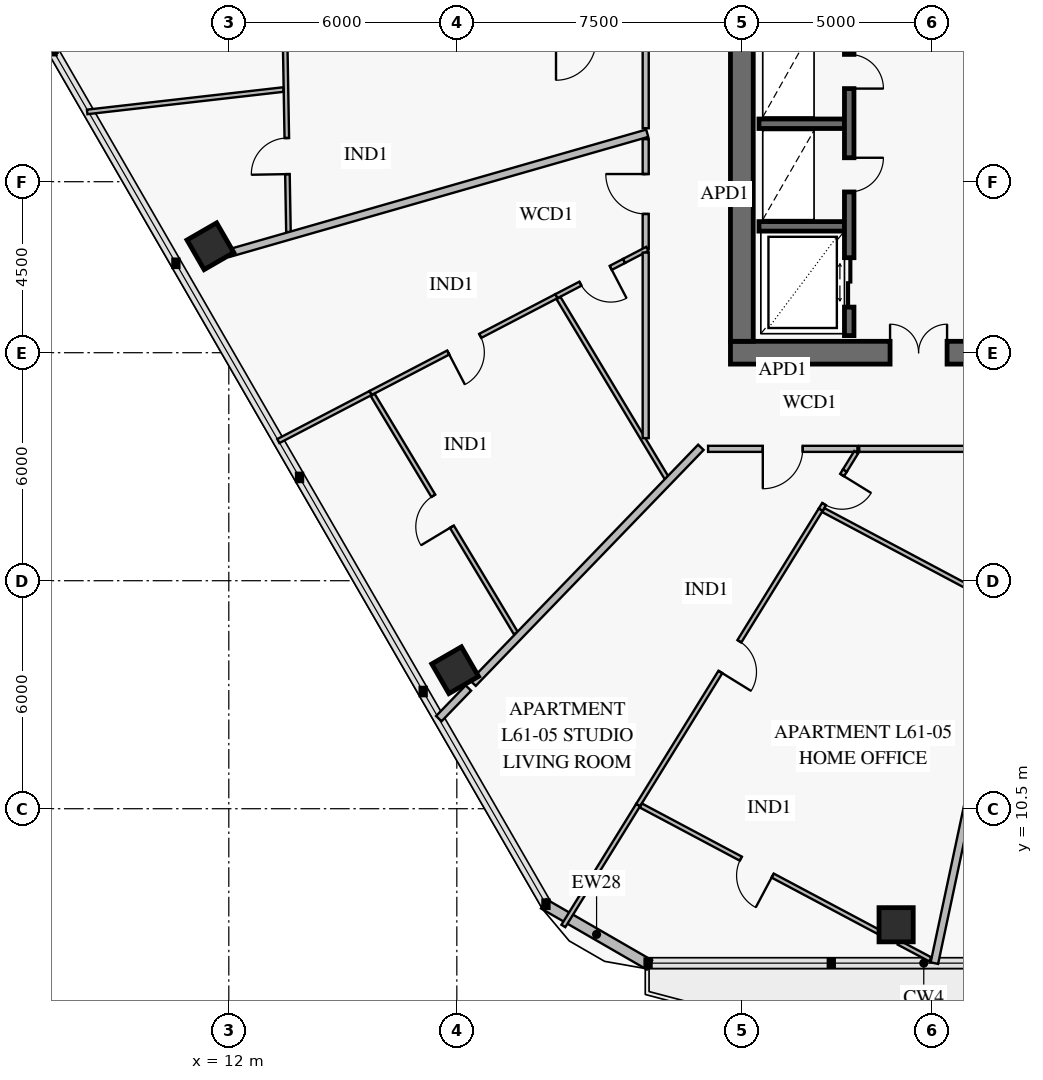
"""IFC4 building model, lengths in metres.
Left out: names, types, materials, properties, quantities, classifications, styles, units other than length and angle.
Written with IfcOpenShell. Run it as: python <this file> out.ifc"""

import sys

from ifc_helpers import new_model, si_unit, direction, frame, frame_2d, origin, origin_2d, place, context, subcontext, project, spatial, rectangle, extrude, element, fill, save


model = new_model("IFC4")
c1 = context("Model", 3, precision=1e-05, world=origin(), true_north=direction((0.0, 1.0)))
c2 = subcontext(c1, "Body", "Model", "MODEL_VIEW")
j1 = project(units=[si_unit("LENGTHUNIT", "METRE"), si_unit("PLANEANGLEUNIT", "RADIAN")], contexts=[c1])
p1 = place(None, origin())
s1 = spatial("IfcSite", under=j1, at=p1, CompositionType="ELEMENT")
p2 = place(p1, origin())
s2 = spatial("IfcBuilding", under=s1, at=p2, CompositionType="ELEMENT")
p3 = place(p2, frame((0.0, 0.0, 242.6)))
s3 = spatial("IfcBuildingStorey", under=s2, at=p3, CompositionType="ELEMENT", Elevation=242.6)
p4 = place(p3, frame((25.2, 22.5, 0.0), z_axis=(0.0, 0.0, 1.0), x_axis=(1.0, 0.0, 0.0)))
e1 = element("IfcWall", 1, at=p4, inside=s3, PredefinedType="SHEAR", context=c2, shape_type="SweptSolid", body=[
    extrude(rectangle(XDim=9.85, YDim=0.6, at=frame_2d((4.925, 0.0))), origin(), (0.0, 0.0, 1.0), 3.8),
])
p5 = place(p4, frame((4.2, 0.0, 0.0)))
e2 = element("IfcOpeningElement", 2, at=p5, cuts=e1, PredefinedType="OPENING", context=c2, shape_type="SweptSolid", body=[
    extrude(rectangle(XDim=1.5, YDim=2.15, at=frame_2d((0.75, 1.075))), frame((0.0, 0.312, 0.0), z_axis=(0.0, -1.0, 0.0), x_axis=(1.0, 0.0, 0.0)), (0.0, 0.0, 1.0), 0.624),
])
p6 = place(p3, frame((25.5, 22.8, 0.0), z_axis=(0.0, 0.0, 1.0), x_axis=(0.0, 1.0, 0.0)))
e3 = element("IfcWall", 3, at=p6, inside=s3, PredefinedType="SHEAR", context=c2, shape_type="SweptSolid", body=[
    extrude(rectangle(XDim=18.4, YDim=0.6, at=frame_2d((9.2, 0.0))), origin(), (0.0, 0.0, 1.0), 3.8),
])
p7 = place(p6, frame((8.95, 0.0, 0.0)))
e4 = element("IfcOpeningElement", 4, at=p7, cuts=e3, PredefinedType="OPENING", context=c2, shape_type="SweptSolid", body=[
    extrude(rectangle(XDim=1.1, YDim=2.15, at=frame_2d((0.55, 1.075))), frame((0.0, 0.312, 0.0), z_axis=(0.0, -1.0, 0.0), x_axis=(1.0, 0.0, 0.0)), (0.0, 0.0, 1.0), 0.624),
])
for number, where, z_axis, x_axis in (
    (5, (11.515, 25.301, 0.0), (0.0, 0.0, 1.0), (0.5, -0.866, 0.0)),
    (6, (17.956, 14.145, 0.0), (0.0, 0.0, 1.0), (0.5, -0.866, 0.0)),
    (7, (29.559, 7.446, 0.0), (0.0, 0.0, 1.0), (1.0, 0.0, 0.0)),
):
    element("IfcColumn", number, at=place(p3, frame(where, z_axis=z_axis, x_axis=x_axis)), inside=s3, PredefinedType="COLUMN", context=c2, shape_type="SweptSolid", body=[
        extrude(rectangle(XDim=0.9, YDim=0.9, at=origin_2d()), origin(), (0.0, 0.0, 1.0), 3.55),
    ])
for number, where, z_axis, x_axis in (
    (8, (23.07, 6.389, 0.0), (0.0, 0.0, 1.0), (-0.866, 0.5, 0.0)),
    (9, (7.355, 30.393, 0.0), (0.0, 0.0, 1.0), (0.0, 1.0, 0.0)),
):
    element("IfcWall", number, at=place(p3, frame(where, z_axis=z_axis, x_axis=x_axis)), inside=s3, PredefinedType="SOLIDWALL", context=c2, shape_type="SweptSolid", body=[
        extrude(rectangle(XDim=3.215, YDim=0.28, at=frame_2d((1.607, 0.0))), origin(), (0.0, 0.0, 1.0), 3.55),
    ])
for number, where, z_axis, x_axis in (
    (10, (25.95, 25.825, 0.0), (0.0, 0.0, 1.0), (1.0, 0.0, 0.0)),
    (11, (25.95, 28.525, 0.0), (0.0, 0.0, 1.0), (1.0, 0.0, 0.0)),
):
    element("IfcWall", number, at=place(p3, frame(where, z_axis=z_axis, x_axis=x_axis)), inside=s3, PredefinedType="SOLIDWALL", context=c2, shape_type="SweptSolid", body=[
        extrude(rectangle(XDim=2.25, YDim=0.25, at=frame_2d((1.125, 0.0))), origin(), (0.0, 0.0, 1.0), 3.8),
    ])
p8 = place(p3, frame((28.325, 22.95, 0.0), z_axis=(0.0, 0.0, 1.0), x_axis=(0.0, 1.0, 0.0)))
e12 = element("IfcWall", 12, at=p8, inside=s3, PredefinedType="SOLIDWALL", context=c2, shape_type="SweptSolid", body=[
    extrude(rectangle(XDim=8.2, YDim=0.25, at=frame_2d((4.1, 0.0))), origin(), (0.0, 0.0, 1.0), 3.8),
])
p9 = place(p8, frame((0.75, 0.0, 0.0)))
e13 = element("IfcOpeningElement", 13, at=p9, cuts=e12, PredefinedType="OPENING", context=c2, shape_type="SweptSolid", body=[
    extrude(rectangle(XDim=1.3, YDim=2.3, at=frame_2d((0.65, 1.15))), frame((0.0, 0.137, 0.0), z_axis=(0.0, -1.0, 0.0), x_axis=(1.0, 0.0, 0.0)), (0.0, 0.0, 1.0), 0.274),
])
p10 = place(p8, frame((3.78, 0.0, 0.0)))
e14 = element("IfcOpeningElement", 14, at=p10, cuts=e12, PredefinedType="OPENING", context=c2, shape_type="SweptSolid", body=[
    extrude(rectangle(XDim=0.9, YDim=2.1, at=frame_2d((0.45, 1.05))), frame((0.0, 0.137, 0.0), z_axis=(0.0, -1.0, 0.0), x_axis=(1.0, 0.0, 0.0)), (0.0, 0.0, 1.0), 0.274),
])
p11 = place(p8, frame((6.5, 0.0, 0.0)))
e15 = element("IfcOpeningElement", 15, at=p11, cuts=e12, PredefinedType="OPENING", context=c2, shape_type="SweptSolid", body=[
    extrude(rectangle(XDim=0.9, YDim=2.1, at=frame_2d((0.45, 1.05))), frame((0.0, 0.137, 0.0), z_axis=(0.0, -1.0, 0.0), x_axis=(1.0, 0.0, 0.0)), (0.0, 0.0, 1.0), 0.274),
])
p12 = place(p3, frame((13.44, 33.077, 0.0), z_axis=(0.0, 0.0, 1.0), x_axis=(0.01747984643, -0.999847215813, 0.0)))
e16 = element("IfcWall", 16, at=p12, inside=s3, PredefinedType="PARTITIONING", context=c2, shape_type="SweptSolid", body=[
    extrude(rectangle(XDim=7.403, YDim=0.12, at=frame_2d((3.701, 0.0))), origin(), (0.0, 0.0, 1.0), 2.95),
])
p13 = place(p12, frame((1.468, 0.0, 0.0)))
e17 = element("IfcOpeningElement", 17, at=p13, cuts=e16, PredefinedType="OPENING", context=c2, shape_type="SweptSolid", body=[
    extrude(rectangle(XDim=0.95, YDim=2.1, at=frame_2d((0.475, 1.05))), frame((0.0, 0.072, 0.0), z_axis=(0.0, -1.0, 0.0), x_axis=(1.0, 0.0, 0.0)), (0.0, 0.0, 1.0), 0.144),
])
p14 = place(p12, frame((4.929, 0.0, 0.0)))
e18 = element("IfcOpeningElement", 18, at=p14, cuts=e16, PredefinedType="OPENING", context=c2, shape_type="SweptSolid", body=[
    extrude(rectangle(XDim=0.95, YDim=2.1, at=frame_2d((0.475, 1.05))), frame((0.0, 0.072, 0.0), z_axis=(0.0, -1.0, 0.0), x_axis=(1.0, 0.0, 0.0)), (0.0, 0.0, 1.0), 0.144),
])
p15 = place(p3, frame((22.4, 24.914, 0.0), z_axis=(0.0, 0.0, 1.0), x_axis=(-0.886792724396, -0.462167354926, 0.0)))
e19 = element("IfcWall", 19, at=p15, inside=s3, PredefinedType="PARTITIONING", context=c2, shape_type="SweptSolid", body=[
    extrude(rectangle(XDim=2.01, YDim=0.12, at=frame_2d((1.005, 0.0))), origin(), (0.0, 0.0, 1.0), 3.55),
])
p16 = place(p15, frame((0.394, 0.0, 0.0)))
e20 = element("IfcOpeningElement", 20, at=p16, cuts=e19, PredefinedType="OPENING", context=c2, shape_type="SweptSolid", body=[
    extrude(rectangle(XDim=0.9, YDim=2.1, at=frame_2d((0.45, 1.05))), frame((0.0, 0.072, 0.0), z_axis=(0.0, -1.0, 0.0), x_axis=(1.0, 0.0, 0.0)), (0.0, 0.0, 1.0), 0.144),
])
p17 = place(p3, frame((20.618, 23.986, 0.0), z_axis=(0.0, 0.0, 1.0), x_axis=(-0.886846806797, -0.462063568434, 0.0)))
e21 = element("IfcWall", 21, at=p17, inside=s3, PredefinedType="PARTITIONING", context=c2, shape_type="SweptSolid", body=[
    extrude(rectangle(XDim=5.514, YDim=0.12, at=frame_2d((2.757, 0.0))), origin(), (0.0, 0.0, 1.0), 3.15),
])
p18 = place(p17, frame((2.257, 0.0, 0.0)))
e22 = element("IfcOpeningElement", 22, at=p18, cuts=e21, PredefinedType="OPENING", context=c2, shape_type="SweptSolid", body=[
    extrude(rectangle(XDim=0.95, YDim=2.1, at=frame_2d((0.475, 1.05))), frame((0.0, 0.072, 0.0), z_axis=(0.0, -1.0, 0.0), x_axis=(1.0, 0.0, 0.0)), (0.0, 0.0, 1.0), 0.144),
])
p19 = place(p3, frame((15.785, 21.391, 0.0), z_axis=(0.0, 0.0, 1.0), x_axis=(0.515050233646, -0.857159994879, 0.0)))
e23 = element("IfcWall", 23, at=p19, inside=s3, PredefinedType="PARTITIONING", context=c2, shape_type="SweptSolid", body=[
    extrude(rectangle(XDim=7.315, YDim=0.12, at=frame_2d((3.658, 0.0))), origin(), (0.0, 0.0, 1.0), 2.95),
])
p20 = place(p19, frame((3.099, 0.0, 0.0)))
e24 = element("IfcOpeningElement", 24, at=p20, cuts=e23, PredefinedType="OPENING", context=c2, shape_type="SweptSolid", body=[
    extrude(rectangle(XDim=0.95, YDim=2.1, at=frame_2d((0.475, 1.05))), frame((0.0, 0.072, 0.0), z_axis=(0.0, -1.0, 0.0), x_axis=(1.0, 0.0, 0.0)), (0.0, 0.0, 1.0), 0.144),
])
p21 = place(p3, frame((22.97, 28.119, 0.0), z_axis=(0.0, 0.0, 1.0), x_axis=(0.0, -1.0, 0.0)))
e25 = element("IfcWall", 25, at=p21, inside=s3, PredefinedType="PARTITIONING", context=c2, shape_type="SweptSolid", body=[
    extrude(rectangle(XDim=2.885, YDim=0.16, at=frame_2d((1.443, 0.0))), origin(), (0.0, 0.0, 1.0), 3.55),
])
p22 = place(p21, frame((0.918, 0.0, 0.0)))
e26 = element("IfcOpeningElement", 26, at=p22, cuts=e25, PredefinedType="OPENING", context=c2, shape_type="SweptSolid", body=[
    extrude(rectangle(XDim=1.05, YDim=2.15, at=frame_2d((0.525, 1.075))), frame((0.0, 0.092, 0.0), z_axis=(0.0, -1.0, 0.0), x_axis=(1.0, 0.0, 0.0)), (0.0, 0.0, 1.0), 0.184),
])
p23 = place(p3, frame((28.212, 19.4, 0.0), z_axis=(0.0, 0.0, 1.0), x_axis=(-0.525724166979, -0.850655100646, 0.0)))
e27 = element("IfcWall", 27, at=p23, inside=s3, PredefinedType="PARTITIONING", context=c2, shape_type="SweptSolid", body=[
    extrude(rectangle(XDim=1.213, YDim=0.12, at=frame_2d((0.607, 0.0))), origin(), (0.0, 0.0, 1.0), 3.55),
])
p24 = place(p23, frame((0.14, 0.0, 0.0)))
e28 = element("IfcOpeningElement", 28, at=p24, cuts=e27, PredefinedType="OPENING", context=c2, shape_type="SweptSolid", body=[
    extrude(rectangle(XDim=0.9, YDim=2.1, at=frame_2d((0.45, 1.05))), frame((0.0, 0.072, 0.0), z_axis=(0.0, -1.0, 0.0), x_axis=(1.0, 0.0, 0.0)), (0.0, 0.0, 1.0), 0.144),
])
p25 = place(p3, frame((27.574, 18.368, 0.0), z_axis=(0.0, 0.0, 1.0), x_axis=(-0.525774998316, -0.850623683626, 0.0)))
e29 = element("IfcWall", 29, at=p25, inside=s3, PredefinedType="PARTITIONING", context=c2, shape_type="SweptSolid", body=[
    extrude(rectangle(XDim=9.137, YDim=0.12, at=frame_2d((4.569, 0.0))), origin(), (0.0, 0.0, 1.0), 2.93),
])
p26 = place(p25, frame((4.069, 0.0, 0.0)))
e30 = element("IfcOpeningElement", 30, at=p26, cuts=e29, PredefinedType="OPENING", context=c2, shape_type="SweptSolid", body=[
    extrude(rectangle(XDim=0.95, YDim=2.1, at=frame_2d((0.475, 1.05))), frame((0.0, 0.072, 0.0), z_axis=(0.0, -1.0, 0.0), x_axis=(1.0, 0.0, 0.0)), (0.0, 0.0, 1.0), 0.144),
])
p27 = place(p3, frame((22.843, 10.584, 0.0), z_axis=(0.0, 0.0, 1.0), x_axis=(0.882936922094, -0.469491631026, 0.0)))
e31 = element("IfcWall", 31, at=p27, inside=s3, PredefinedType="PARTITIONING", context=c2, shape_type="SweptSolid", body=[
    extrude(rectangle(XDim=7.074, YDim=0.12, at=frame_2d((3.537, 0.0))), origin(), (0.0, 0.0, 1.0), 3.55),
])
p28 = place(p27, frame((2.978, 0.0, 0.0)))
e32 = element("IfcOpeningElement", 32, at=p28, cuts=e31, PredefinedType="OPENING", context=c2, shape_type="SweptSolid", body=[
    extrude(rectangle(XDim=0.95, YDim=2.1, at=frame_2d((0.475, 1.05))), frame((0.0, 0.072, 0.0), z_axis=(0.0, -1.0, 0.0), x_axis=(1.0, 0.0, 0.0)), (0.0, 0.0, 1.0), 0.144),
])
p29 = place(p3, frame((24.612, 19.97, 0.0), z_axis=(0.0, 0.0, 1.0), x_axis=(1.0, 0.0, 0.0)))
e33 = element("IfcWall", 33, at=p29, inside=s3, PredefinedType="PARTITIONING", context=c2, shape_type="SweptSolid", body=[
    extrude(rectangle(XDim=3.929, YDim=0.16, at=frame_2d((1.965, 0.0))), origin(), (0.0, 0.0, 1.0), 3.55),
])
p30 = place(p29, frame((1.44, 0.0, 0.0)))
e34 = element("IfcOpeningElement", 34, at=p30, cuts=e33, PredefinedType="OPENING", context=c2, shape_type="SweptSolid", body=[
    extrude(rectangle(XDim=1.05, YDim=2.15, at=frame_2d((0.525, 1.075))), frame((0.0, 0.092, 0.0), z_axis=(0.0, -1.0, 0.0), x_axis=(1.0, 0.0, 0.0)), (0.0, 0.0, 1.0), 0.184),
])
p31 = place(p3, frame((13.436, 29.425, 0.0), z_axis=(0.0, 0.0, 1.0), x_axis=(-0.99355159017, -0.11338094051, 0.0)))
e35 = element("IfcWall", 35, at=p31, inside=s3, PredefinedType="PARTITIONING", context=c2, shape_type="SweptSolid", body=[
    extrude(rectangle(XDim=5.196, YDim=0.12, at=frame_2d((2.598, 0.0))), origin(), (0.0, 0.0, 1.0), 2.93),
])
p32 = place(p3, frame((23.01, 28.275, 0.0), z_axis=(0.0, 0.0, 1.0), x_axis=(-0.961263244987, -0.275631953585, 0.0)))
e36 = element("IfcWall", 36, at=p32, inside=s3, PredefinedType="PARTITIONING", context=c2, shape_type="SweptSolid", body=[
    extrude(rectangle(XDim=11.469, YDim=0.2, at=frame_2d((5.734, 0.0))), origin(), (0.0, 0.0, 1.0), 2.95),
])
p33 = place(p3, frame((23.012, 25.233, 0.0), z_axis=(0.0, 0.0, 1.0), x_axis=(-0.886950303541, -0.461864870983, 0.0)))
e37 = element("IfcWall", 37, at=p33, inside=s3, PredefinedType="PARTITIONING", context=c2, shape_type="SweptSolid", body=[
    extrude(rectangle(XDim=0.69, YDim=0.12, at=frame_2d((0.345, 0.0))), origin(), (0.0, 0.0, 1.0), 3.55),
])
p34 = place(p3, frame((15.728, 21.438, 0.0), z_axis=(0.0, 0.0, 1.0), x_axis=(-0.886855386052, -0.462047101745, 0.0)))
e38 = element("IfcWall", 38, at=p34, inside=s3, PredefinedType="PARTITIONING", context=c2, shape_type="SweptSolid", body=[
    extrude(rectangle(XDim=2.734, YDim=0.12, at=frame_2d((1.367, 0.0))), origin(), (0.0, 0.0, 1.0), 2.93),
])
p35 = place(p3, frame((20.675, 23.939, 0.0), z_axis=(0.0, 0.0, 1.0), x_axis=(0.515057714927, -0.857155499483, 0.0)))
e39 = element("IfcWall", 39, at=p35, inside=s3, PredefinedType="PARTITIONING", context=c2, shape_type="SweptSolid", body=[
    extrude(rectangle(XDim=5.557, YDim=0.12, at=frame_2d((2.779, 0.0))), origin(), (0.0, 0.0, 1.0), 2.95),
])
p36 = place(p3, frame((24.421, 20.01, 0.0), z_axis=(0.0, 0.0, 1.0), x_axis=(-0.694650551067, -0.719347351355, 0.0)))
e40 = element("IfcWall", 40, at=p36, inside=s3, PredefinedType="PARTITIONING", context=c2, shape_type="SweptSolid", body=[
    extrude(rectangle(XDim=8.63, YDim=0.2, at=frame_2d((4.315, 0.0))), origin(), (0.0, 0.0, 1.0), 2.93),
])
p37 = place(p3, frame((18.304, 13.675, 0.0), z_axis=(0.0, 0.0, 1.0), x_axis=(-0.69467624965, -0.719322534175, 0.0)))
e41 = element("IfcWall", 41, at=p37, inside=s3, PredefinedType="PARTITIONING", context=c2, shape_type="SweptSolid", body=[
    extrude(rectangle(XDim=1.119, YDim=0.2, at=frame_2d((0.56, 0.0))), origin(), (0.0, 0.0, 1.0), 3.122),
])
p38 = place(p3, frame((28.51, 19.882, 0.0), z_axis=(0.0, 0.0, 1.0), x_axis=(-0.525850424149, -0.850577057898, 0.0)))
e42 = element("IfcWall", 42, at=p38, inside=s3, PredefinedType="PARTITIONING", context=c2, shape_type="SweptSolid", body=[
    extrude(rectangle(XDim=0.567, YDim=0.12, at=frame_2d((0.283, 0.0))), origin(), (0.0, 0.0, 1.0), 3.55),
])
p39 = place(p3, frame((22.77, 10.595, 0.0), z_axis=(0.0, 0.0, 1.0), x_axis=(-0.525761118402, -0.850632262718, 0.0)))
e43 = element("IfcWall", 43, at=p39, inside=s3, PredefinedType="PARTITIONING", context=c2, shape_type="SweptSolid", body=[
    extrude(rectangle(XDim=3.74, YDim=0.12, at=frame_2d((1.87, 0.0))), origin(), (0.0, 0.0, 1.0), 3.55),
])
p40 = place(p3, frame((27.647, 18.357, 0.0), z_axis=(0.0, 0.0, 1.0), x_axis=(0.882946751735, -0.469473144706, 0.0)))
e44 = element("IfcWall", 44, at=p40, inside=s3, PredefinedType="PARTITIONING", context=c2, shape_type="SweptSolid", body=[
    extrude(rectangle(XDim=5.502, YDim=0.12, at=frame_2d((2.751, 0.0))), origin(), (0.0, 0.0, 1.0), 2.95),
])
p41 = place(p3, frame((29.629, 6.976, 0.0), z_axis=(0.0, 0.0, 1.0), x_axis=(0.883014643107, -0.46934543788, 0.0)))
e45 = element("IfcWall", 45, at=p41, inside=s3, PredefinedType="PARTITIONING", context=c2, shape_type="SweptSolid", body=[
    extrude(rectangle(XDim=0.938, YDim=0.12, at=frame_2d((0.469, 0.0))), origin(), (0.0, 0.0, 1.0), 3.55),
])
p42 = place(p3, frame((33.451, 20.01, 0.0), z_axis=(0.0, 0.0, 1.0), x_axis=(-0.207899576005, -0.978150175738, 0.0)))
e46 = element("IfcWall", 46, at=p42, inside=s3, PredefinedType="PARTITIONING", context=c2, shape_type="SweptSolid", body=[
    extrude(rectangle(XDim=13.877, YDim=0.2, at=frame_2d((6.938, 0.0))), origin(), (0.0, 0.0, 1.0), 2.93),
])
p43 = place(p3, frame((22.97, 30.632, 0.0), z_axis=(0.0, 0.0, 1.0), x_axis=(0.0, -1.0, 0.0)))
e47 = element("IfcWall", 47, at=p43, inside=s3, PredefinedType="PARTITIONING", context=c2, shape_type="SweptSolid", body=[
    extrude(rectangle(XDim=2.225, YDim=0.16, at=frame_2d((1.112, 0.0))), origin(), (0.0, 0.0, 1.0), 2.95),
])
p44 = place(p3, frame((22.97, 25.135, 0.0), z_axis=(0.0, 0.0, 1.0), x_axis=(0.0, -1.0, 0.0)))
e48 = element("IfcWall", 48, at=p44, inside=s3, PredefinedType="PARTITIONING", context=c2, shape_type="SweptSolid", body=[
    extrude(rectangle(XDim=4.883, YDim=0.16, at=frame_2d((2.441, 0.0))), origin(), (0.0, 0.0, 1.0), 3.55),
])
p45 = place(p3, frame((28.588, 19.97, 0.0), z_axis=(0.0, 0.0, 1.0), x_axis=(1.0, 0.0, 0.0)))
e49 = element("IfcWall", 49, at=p45, inside=s3, PredefinedType="PARTITIONING", context=c2, shape_type="SweptSolid", body=[
    extrude(rectangle(XDim=4.725, YDim=0.16, at=frame_2d((2.362, 0.0))), origin(), (0.0, 0.0, 1.0), 2.95),
])
p46 = place(p5, origin())
e50 = element("IfcDoor", 50, at=p46, inside=s3, OperationType="DOUBLE_DOOR_SINGLE_SWING", PredefinedType="DOOR", context=c2, shape_type="SweptSolid", body=[
    extrude(rectangle(XDim=1.5, YDim=2.15, at=frame_2d((0.75, 1.075))), frame((0.0, 0.025, 0.0), z_axis=(0.0, -1.0, 0.0), x_axis=(1.0, 0.0, 0.0)), (0.0, 0.0, 1.0), 0.05),
])
fill(e2, e50)
p47 = place(p9, frame((1.3, 0.0, 0.0), z_axis=(0.0, 0.0, 1.0), x_axis=(-1.0, 0.0, 0.0)))
e51 = element("IfcDoor", 51, at=p47, inside=s3, OperationType="DOUBLE_DOOR_SLIDING", PredefinedType="DOOR", context=c2, shape_type="SweptSolid", body=[
    extrude(rectangle(XDim=1.3, YDim=2.3, at=frame_2d((0.65, 1.15))), frame((0.0, 0.025, 0.0), z_axis=(0.0, -1.0, 0.0), x_axis=(1.0, 0.0, 0.0)), (0.0, 0.0, 1.0), 0.05),
])
fill(e13, e51)
p48 = place(p10, frame((0.9, 0.0, 0.0), z_axis=(0.0, 0.0, 1.0), x_axis=(-1.0, 0.0, 0.0)))
e52 = element("IfcDoor", 52, at=p48, inside=s3, OperationType="SINGLE_SWING_LEFT", PredefinedType="DOOR", context=c2, shape_type="SweptSolid", body=[
    extrude(rectangle(XDim=0.9, YDim=2.1, at=frame_2d((0.45, 1.05))), frame((0.0, 0.025, 0.0), z_axis=(0.0, -1.0, 0.0), x_axis=(1.0, 0.0, 0.0)), (0.0, 0.0, 1.0), 0.05),
])
fill(e14, e52)
p49 = place(p11, frame((0.9, 0.0, 0.0), z_axis=(0.0, 0.0, 1.0), x_axis=(-1.0, 0.0, 0.0)))
e53 = element("IfcDoor", 53, at=p49, inside=s3, OperationType="SINGLE_SWING_RIGHT", PredefinedType="DOOR", context=c2, shape_type="SweptSolid", body=[
    extrude(rectangle(XDim=0.9, YDim=2.1, at=frame_2d((0.45, 1.05))), frame((0.0, 0.025, 0.0), z_axis=(0.0, -1.0, 0.0), x_axis=(1.0, 0.0, 0.0)), (0.0, 0.0, 1.0), 0.05),
])
fill(e15, e53)
p50 = place(p14, frame((0.95, 0.0, 0.0), z_axis=(0.0, 0.0, 1.0), x_axis=(-1.0, 0.0, 0.0)))
e54 = element("IfcDoor", 54, at=p50, inside=s3, OperationType="SINGLE_SWING_LEFT", PredefinedType="DOOR", context=c2, shape_type="SweptSolid", body=[
    extrude(rectangle(XDim=0.95, YDim=2.1, at=frame_2d((0.475, 1.05))), frame((0.0, 0.025, 0.0), z_axis=(0.0, -1.0, 0.0), x_axis=(1.0, 0.0, 0.0)), (0.0, 0.0, 1.0), 0.05),
])
fill(e18, e54)
p51 = place(p16, origin())
e55 = element("IfcDoor", 55, at=p51, inside=s3, OperationType="SINGLE_SWING_LEFT", PredefinedType="DOOR", context=c2, shape_type="SweptSolid", body=[
    extrude(rectangle(XDim=0.9, YDim=2.1, at=frame_2d((0.45, 1.05))), frame((0.0, 0.025, 0.0), z_axis=(0.0, -1.0, 0.0), x_axis=(1.0, 0.0, 0.0)), (0.0, 0.0, 1.0), 0.05),
])
fill(e20, e55)
p52 = place(p18, origin())
e56 = element("IfcDoor", 56, at=p52, inside=s3, OperationType="SINGLE_SWING_RIGHT", PredefinedType="DOOR", context=c2, shape_type="SweptSolid", body=[
    extrude(rectangle(XDim=0.95, YDim=2.1, at=frame_2d((0.475, 1.05))), frame((0.0, 0.025, 0.0), z_axis=(0.0, -1.0, 0.0), x_axis=(1.0, 0.0, 0.0)), (0.0, 0.0, 1.0), 0.05),
])
fill(e22, e56)
p53 = place(p20, frame((0.95, 0.0, 0.0), z_axis=(0.0, 0.0, 1.0), x_axis=(-1.0, 0.0, 0.0)))
e57 = element("IfcDoor", 57, at=p53, inside=s3, OperationType="SINGLE_SWING_LEFT", PredefinedType="DOOR", context=c2, shape_type="SweptSolid", body=[
    extrude(rectangle(XDim=0.95, YDim=2.1, at=frame_2d((0.475, 1.05))), frame((0.0, 0.025, 0.0), z_axis=(0.0, -1.0, 0.0), x_axis=(1.0, 0.0, 0.0)), (0.0, 0.0, 1.0), 0.05),
])
fill(e24, e57)
p54 = place(p22, frame((1.05, 0.0, 0.0), z_axis=(0.0, 0.0, 1.0), x_axis=(-1.0, 0.0, 0.0)))
e58 = element("IfcDoor", 58, at=p54, inside=s3, OperationType="SINGLE_SWING_RIGHT", PredefinedType="DOOR", context=c2, shape_type="SweptSolid", body=[
    extrude(rectangle(XDim=1.05, YDim=2.15, at=frame_2d((0.525, 1.075))), frame((0.0, 0.025, 0.0), z_axis=(0.0, -1.0, 0.0), x_axis=(1.0, 0.0, 0.0)), (0.0, 0.0, 1.0), 0.05),
])
fill(e26, e58)
p55 = place(p24, origin())
e59 = element("IfcDoor", 59, at=p55, inside=s3, OperationType="SINGLE_SWING_LEFT", PredefinedType="DOOR", context=c2, shape_type="SweptSolid", body=[
    extrude(rectangle(XDim=0.9, YDim=2.1, at=frame_2d((0.45, 1.05))), frame((0.0, 0.025, 0.0), z_axis=(0.0, -1.0, 0.0), x_axis=(1.0, 0.0, 0.0)), (0.0, 0.0, 1.0), 0.05),
])
fill(e28, e59)
p56 = place(p26, origin())
e60 = element("IfcDoor", 60, at=p56, inside=s3, OperationType="SINGLE_SWING_RIGHT", PredefinedType="DOOR", context=c2, shape_type="SweptSolid", body=[
    extrude(rectangle(XDim=0.95, YDim=2.1, at=frame_2d((0.475, 1.05))), frame((0.0, 0.025, 0.0), z_axis=(0.0, -1.0, 0.0), x_axis=(1.0, 0.0, 0.0)), (0.0, 0.0, 1.0), 0.05),
])
fill(e30, e60)
p57 = place(p28, frame((0.95, 0.0, 0.0), z_axis=(0.0, 0.0, 1.0), x_axis=(-1.0, 0.0, 0.0)))
e61 = element("IfcDoor", 61, at=p57, inside=s3, OperationType="SINGLE_SWING_LEFT", PredefinedType="DOOR", context=c2, shape_type="SweptSolid", body=[
    extrude(rectangle(XDim=0.95, YDim=2.1, at=frame_2d((0.475, 1.05))), frame((0.0, 0.025, 0.0), z_axis=(0.0, -1.0, 0.0), x_axis=(1.0, 0.0, 0.0)), (0.0, 0.0, 1.0), 0.05),
])
fill(e32, e61)
p58 = place(p30, frame((1.05, 0.0, 0.0), z_axis=(0.0, 0.0, 1.0), x_axis=(-1.0, 0.0, 0.0)))
e62 = element("IfcDoor", 62, at=p58, inside=s3, OperationType="SINGLE_SWING_RIGHT", PredefinedType="DOOR", context=c2, shape_type="SweptSolid", body=[
    extrude(rectangle(XDim=1.05, YDim=2.15, at=frame_2d((0.525, 1.075))), frame((0.0, 0.025, 0.0), z_axis=(0.0, -1.0, 0.0), x_axis=(1.0, 0.0, 0.0)), (0.0, 0.0, 1.0), 0.05),
])
fill(e34, e62)
save(model, sys.argv[1])
